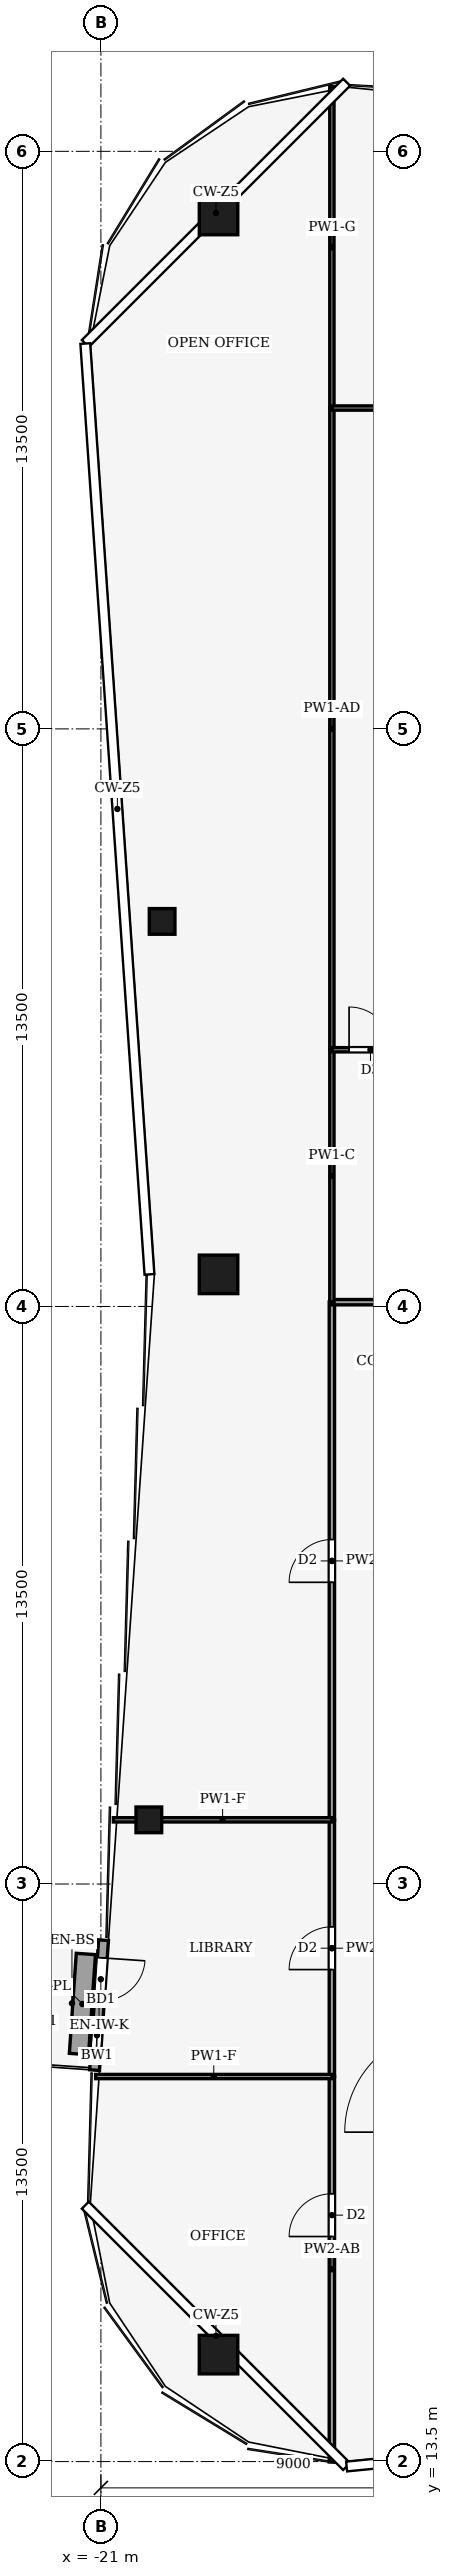
"""IFC4 building model, lengths in metres.
Left out: names, types, materials, properties, quantities, classifications, styles, units other than length and angle.
Written with IfcOpenShell. Run it as: python <this file> out.ifc"""

import sys

from ifc_helpers import new_model, si_unit, direction, frame, frame_2d, origin, origin_2d, place, context, subcontext, project, spatial, rectangle, hollow_rectangle, extrude, element, fill, save


model = new_model("IFC4")
c1 = context("Model", 3, precision=1e-05, world=origin(), true_north=direction((0.0, 1.0)))
c2 = subcontext(c1, "Body", "Model", "MODEL_VIEW")
j1 = project(units=[si_unit("LENGTHUNIT", "METRE"), si_unit("PLANEANGLEUNIT", "RADIAN")], contexts=[c1])
p1 = place(None, origin())
s1 = spatial("IfcSite", under=j1, at=p1, CompositionType="ELEMENT")
p2 = place(p1, origin())
s2 = spatial("IfcBuilding", under=s1, at=p2, CompositionType="ELEMENT")
p3 = place(p2, frame((0.0, 0.0, 326.0)))
s3 = spatial("IfcBuildingStorey", under=s2, at=p3, CompositionType="ELEMENT", Elevation=326.0)
for number, where, z_axis, x_axis in (
    (1, (-18.25, 66.0, 0.0), (0.0, 0.0, 1.0), (1.0, 0.0, 0.0)),
    (2, (-18.25, 16.0, 0.0), (0.0, 0.0, 1.0), (1.0, 0.0, 0.0)),
    (3, (-18.25, 41.25, 0.0), (0.0, 0.0, 1.0), (1.0, 0.0, 0.0)),
):
    element("IfcColumn", number, at=place(p3, frame(where, z_axis=z_axis, x_axis=x_axis)), inside=s3, PredefinedType="COLUMN", context=c2, shape_type="SweptSolid", body=[
        extrude(hollow_rectangle(XDim=0.9, YDim=0.9, WallThickness=0.04, at=origin_2d()), origin(), (0.0, 0.0, 1.0), 4.0),
    ])
for number, where, z_axis, x_axis in (
    (4, (-19.879, 28.5, 0.0), (0.0, 0.0, 1.0), (1.0, 0.0, 0.0)),
    (5, (-19.569, 49.5, 0.0), (0.0, 0.0, 1.0), (1.0, 0.0, 0.0)),
):
    element("IfcColumn", number, at=place(p3, frame(where, z_axis=z_axis, x_axis=x_axis)), inside=s3, PredefinedType="COLUMN", context=c2, shape_type="SweptSolid", body=[
        extrude(hollow_rectangle(XDim=0.6, YDim=0.6, WallThickness=0.025, at=origin_2d()), origin(), (0.0, 0.0, 1.0), 4.0),
    ])
p4 = place(p3, frame((-20.938, 25.687, 0.0), z_axis=(0.0, 0.0, 1.0), x_axis=(-0.068802091615, -0.997630328423, 0.0)))
e6 = element("IfcWall", 6, at=p4, inside=s3, PredefinedType="SOLIDWALL", context=c2, shape_type="SweptSolid", body=[
    extrude(rectangle(XDim=3.045, YDim=0.23, at=frame_2d((1.522, 0.0))), origin(), (0.0, 0.0, 1.0), 3.65),
])
p5 = place(p4, frame((0.415, 0.0, 0.0)))
e7 = element("IfcOpeningElement", 7, at=p5, cuts=e6, PredefinedType="OPENING", context=c2, shape_type="SweptSolid", body=[
    extrude(rectangle(XDim=1.0, YDim=2.1, at=frame_2d((0.5, 1.05))), frame((0.0, 0.125, 0.0), z_axis=(0.0, -1.0, 0.0), x_axis=(1.0, 0.0, 0.0)), (0.0, 0.0, 1.0), 0.25),
])
p6 = place(p4, frame((1.83, 0.0, 0.9)))
e8 = element("IfcOpeningElement", 8, at=p6, cuts=e6, PredefinedType="OPENING", context=c2, shape_type="SweptSolid", body=[
    extrude(rectangle(XDim=0.8, YDim=1.2, at=frame_2d((0.4, 0.6))), frame((0.0, 0.125, 0.0), z_axis=(0.0, -1.0, 0.0), x_axis=(1.0, 0.0, 0.0)), (0.0, 0.0, 1.0), 0.25),
])
p7 = place(p3, frame((-21.352, 25.365, 0.0), z_axis=(0.0, 0.0, 1.0), x_axis=(-0.068723472833, -0.997635747295, 0.0)))
e9 = element("IfcWall", 9, at=p7, inside=s3, PredefinedType="USERDEFINED", context=c2, shape_type="SweptSolid", body=[
    extrude(rectangle(XDim=2.345, YDim=0.45, at=frame_2d((1.172, 0.0))), origin(), (0.0, 0.0, 1.0), 0.4),
])
p8 = place(p3, frame((-15.6, 13.49, 0.0), z_axis=(0.0, 0.0, 1.0), x_axis=(0.0, 1.0, 0.0)))
e10 = element("IfcWall", 10, at=p8, inside=s3, PredefinedType="PARTITIONING", context=c2, shape_type="SweptSolid", body=[
    extrude(rectangle(XDim=9.01, YDim=0.125, at=frame_2d((4.505, 0.0))), origin(), (0.0, 0.0, 1.0), 2.93),
])
p9 = place(p8, frame((5.271, 0.0, 0.0)))
e11 = element("IfcOpeningElement", 11, at=p9, cuts=e10, PredefinedType="OPENING", context=c2, shape_type="SweptSolid", body=[
    extrude(rectangle(XDim=1.0, YDim=2.1, at=frame_2d((0.5, 1.05))), frame((0.0, 0.073, 0.0), z_axis=(0.0, -1.0, 0.0), x_axis=(1.0, 0.0, 0.0)), (0.0, 0.0, 1.0), 0.145),
])
p10 = place(p3, frame((-15.6, 22.5, 0.0), z_axis=(0.0, 0.0, 1.0), x_axis=(0.0, 1.0, 0.0)))
e12 = element("IfcWall", 12, at=p10, inside=s3, PredefinedType="PARTITIONING", context=c2, shape_type="SweptSolid", body=[
    extrude(rectangle(XDim=6.0, YDim=0.125, at=frame_2d((3.0, 0.0))), origin(), (0.0, 0.0, 1.0), 3.54),
])
p11 = place(p10, frame((2.5, 0.0, 0.0)))
e13 = element("IfcOpeningElement", 13, at=p11, cuts=e12, PredefinedType="OPENING", context=c2, shape_type="SweptSolid", body=[
    extrude(rectangle(XDim=1.0, YDim=2.1, at=frame_2d((0.5, 1.05))), frame((0.0, 0.073, 0.0), z_axis=(0.0, -1.0, 0.0), x_axis=(1.0, 0.0, 0.0)), (0.0, 0.0, 1.0), 0.145),
])
p12 = place(p3, frame((-15.6, 28.5, 0.0), z_axis=(0.0, 0.0, 1.0), x_axis=(0.0, 1.0, 0.0)))
e14 = element("IfcWall", 14, at=p12, inside=s3, PredefinedType="PARTITIONING", context=c2, shape_type="SweptSolid", body=[
    extrude(rectangle(XDim=12.104, YDim=0.125, at=frame_2d((6.052, 0.0))), origin(), (0.0, 0.0, 1.0), 3.14),
])
p13 = place(p12, frame((5.552, 0.0, 0.0)))
e15 = element("IfcOpeningElement", 15, at=p13, cuts=e14, PredefinedType="OPENING", context=c2, shape_type="SweptSolid", body=[
    extrude(rectangle(XDim=1.0, YDim=2.1, at=frame_2d((0.5, 1.05))), frame((0.0, 0.073, 0.0), z_axis=(0.0, -1.0, 0.0), x_axis=(1.0, 0.0, 0.0)), (0.0, 0.0, 1.0), 0.145),
])
p14 = place(p3, frame((-15.6, 40.6, 0.0), z_axis=(0.0, 0.0, 1.0), x_axis=(1.0, 0.0, 0.0)))
e16 = element("IfcWall", 16, at=p14, inside=s3, PredefinedType="PARTITIONING", context=c2, shape_type="SweptSolid", body=[
    extrude(rectangle(XDim=6.6, YDim=0.125, at=frame_2d((3.3, 0.0))), origin(), (0.0, 0.0, 1.0), 3.39),
])
p15 = place(p14, frame((2.8, 0.0, 0.0)))
e17 = element("IfcOpeningElement", 17, at=p15, cuts=e16, PredefinedType="OPENING", context=c2, shape_type="SweptSolid", body=[
    extrude(rectangle(XDim=1.0, YDim=2.1, at=frame_2d((0.5, 1.05))), frame((0.0, 0.073, 0.0), z_axis=(0.0, -1.0, 0.0), x_axis=(1.0, 0.0, 0.0)), (0.0, 0.0, 1.0), 0.145),
])
p16 = place(p3, frame((-15.6, 22.5, 0.0), z_axis=(0.0, 0.0, 1.0), x_axis=(-1.0, 0.0, 0.0)))
e18 = element("IfcWall", 18, at=p16, inside=s3, PredefinedType="PARTITIONING", context=c2, shape_type="SweptSolid", body=[
    extrude(rectangle(XDim=5.523, YDim=0.1, at=frame_2d((2.761, 0.0))), origin(), (0.0, 0.0, 1.0), 3.04),
])
p17 = place(p3, frame((-15.6, 28.5, 0.0), z_axis=(0.0, 0.0, 1.0), x_axis=(-1.0, 0.0, 0.0)))
e19 = element("IfcWall", 19, at=p17, inside=s3, PredefinedType="PARTITIONING", context=c2, shape_type="SweptSolid", body=[
    extrude(rectangle(XDim=5.109, YDim=0.1, at=frame_2d((2.555, 0.0))), origin(), (0.0, 0.0, 1.0), 3.04),
])
p18 = place(p3, frame((-15.6, 40.6, 0.0), z_axis=(0.0, 0.0, 1.0), x_axis=(0.0, 1.0, 0.0)))
e20 = element("IfcWall", 20, at=p18, inside=s3, PredefinedType="PARTITIONING", context=c2, shape_type="SweptSolid", body=[
    extrude(rectangle(XDim=5.9, YDim=0.1, at=frame_2d((2.95, 0.0))), origin(), (0.0, 0.0, 1.0), 3.87),
])
p19 = place(p3, frame((-15.6, 46.5, 0.0), z_axis=(0.0, 0.0, 1.0), x_axis=(0.0, 1.0, 0.0)))
e21 = element("IfcWall", 21, at=p19, inside=s3, PredefinedType="PARTITIONING", context=c2, shape_type="SweptSolid", body=[
    extrude(rectangle(XDim=15.0, YDim=0.1, at=frame_2d((7.5, 0.0))), origin(), (0.0, 0.0, 1.0), 3.35),
])
p20 = place(p3, frame((-15.6, 61.5, 0.0), z_axis=(0.0, 0.0, 1.0), x_axis=(0.0, 1.0, 0.0)))
e22 = element("IfcWall", 22, at=p20, inside=s3, PredefinedType="PARTITIONING", context=c2, shape_type="SweptSolid", body=[
    extrude(rectangle(XDim=7.51, YDim=0.1, at=frame_2d((3.755, 0.0))), origin(), (0.0, 0.0, 1.0), 2.93),
])
p21 = place(p3, frame((-15.6, 46.5, 0.0), z_axis=(0.0, 0.0, 1.0), x_axis=(1.0, 0.0, 0.0)))
e23 = element("IfcWall", 23, at=p21, inside=s3, PredefinedType="PARTITIONING", context=c2, shape_type="SweptSolid", body=[
    extrude(rectangle(XDim=6.604, YDim=0.1, at=frame_2d((3.302, 0.0))), origin(), (0.0, 0.0, 1.0), 3.39),
])
p22 = place(p21, frame((0.402, 0.0, 0.0)))
e24 = element("IfcOpeningElement", 24, at=p22, cuts=e23, PredefinedType="OPENING", context=c2, shape_type="SweptSolid", body=[
    extrude(rectangle(XDim=1.0, YDim=2.1, at=frame_2d((0.5, 1.05))), frame((0.0, 0.06, 0.0), z_axis=(0.0, -1.0, 0.0), x_axis=(1.0, 0.0, 0.0)), (0.0, 0.0, 1.0), 0.12),
])
p23 = place(p3, frame((-15.6, 61.5, 0.0), z_axis=(0.0, 0.0, 1.0), x_axis=(1.0, 0.0, 0.0)))
e25 = element("IfcWall", 25, at=p23, inside=s3, PredefinedType="PARTITIONING", context=c2, shape_type="SweptSolid", body=[
    extrude(rectangle(XDim=9.6, YDim=0.1, at=frame_2d((4.8, 0.0))), origin(), (0.0, 0.0, 1.0), 3.24),
])
p24 = place(p23, frame((4.3, 0.0, 0.0)))
e26 = element("IfcOpeningElement", 26, at=p24, cuts=e25, PredefinedType="OPENING", context=c2, shape_type="SweptSolid", body=[
    extrude(rectangle(XDim=1.0, YDim=2.1, at=frame_2d((0.5, 1.05))), frame((0.0, 0.06, 0.0), z_axis=(0.0, -1.0, 0.0), x_axis=(1.0, 0.0, 0.0)), (0.0, 0.0, 1.0), 0.12),
])
p25 = place(p5, origin())
e27 = element("IfcDoor", 27, at=p25, inside=s3, OperationType="SINGLE_SWING_LEFT", PredefinedType="DOOR", context=c2, shape_type="SweptSolid", body=[
    extrude(rectangle(XDim=1.0, YDim=2.1, at=frame_2d((0.5, 1.05))), frame((0.0, 0.025, 0.0), z_axis=(0.0, -1.0, 0.0), x_axis=(1.0, 0.0, 0.0)), (0.0, 0.0, 1.0), 0.05),
])
fill(e7, e27)
p26 = place(p6, origin())
e28 = element("IfcWindow", 28, at=p26, inside=s3, PartitioningType="SINGLE_PANEL", PredefinedType="WINDOW", context=c2, shape_type="SweptSolid", body=[
    extrude(rectangle(XDim=0.8, YDim=1.2, at=frame_2d((0.4, 0.6))), frame((0.0, 0.03, 0.0), z_axis=(0.0, -1.0, 0.0), x_axis=(1.0, 0.0, 0.0)), (0.0, 0.0, 1.0), 0.06),
])
fill(e8, e28)
p27 = place(p9, origin())
e29 = element("IfcDoor", 29, at=p27, inside=s3, OperationType="SINGLE_SWING_RIGHT", PredefinedType="DOOR", context=c2, shape_type="SweptSolid", body=[
    extrude(rectangle(XDim=1.0, YDim=2.1, at=frame_2d((0.5, 1.05))), frame((0.0, 0.025, 0.0), z_axis=(0.0, -1.0, 0.0), x_axis=(1.0, 0.0, 0.0)), (0.0, 0.0, 1.0), 0.05),
])
fill(e11, e29)
p28 = place(p11, origin())
e30 = element("IfcDoor", 30, at=p28, inside=s3, OperationType="SINGLE_SWING_RIGHT", PredefinedType="DOOR", context=c2, shape_type="SweptSolid", body=[
    extrude(rectangle(XDim=1.0, YDim=2.1, at=frame_2d((0.5, 1.05))), frame((0.0, 0.025, 0.0), z_axis=(0.0, -1.0, 0.0), x_axis=(1.0, 0.0, 0.0)), (0.0, 0.0, 1.0), 0.05),
])
fill(e13, e30)
p29 = place(p13, origin())
e31 = element("IfcDoor", 31, at=p29, inside=s3, OperationType="SINGLE_SWING_LEFT", PredefinedType="DOOR", context=c2, shape_type="SweptSolid", body=[
    extrude(rectangle(XDim=1.0, YDim=2.1, at=frame_2d((0.5, 1.05))), frame((0.0, 0.025, 0.0), z_axis=(0.0, -1.0, 0.0), x_axis=(1.0, 0.0, 0.0)), (0.0, 0.0, 1.0), 0.05),
])
fill(e15, e31)
p30 = place(p22, origin())
e32 = element("IfcDoor", 32, at=p30, inside=s3, OperationType="SINGLE_SWING_LEFT", PredefinedType="DOOR", context=c2, shape_type="SweptSolid", body=[
    extrude(rectangle(XDim=1.0, YDim=2.1, at=frame_2d((0.5, 1.05))), frame((0.0, 0.025, 0.0), z_axis=(0.0, -1.0, 0.0), x_axis=(1.0, 0.0, 0.0)), (0.0, 0.0, 1.0), 0.05),
])
fill(e24, e32)
save(model, sys.argv[1])
